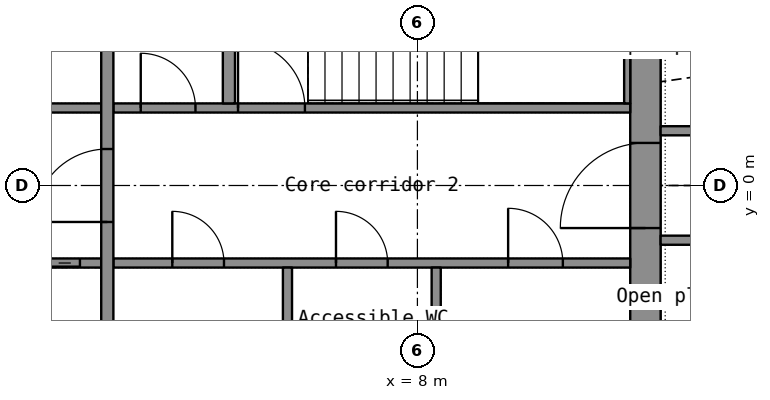
"""IFC4 building model, lengths in metres.
Left out: names, types, materials, properties, quantities, classifications, styles, units other than length and angle.
Written with IfcOpenShell. Run it as: python <this file> out.ifc"""

import sys

from ifc_helpers import new_model, si_unit, direction, frame, frame_2d, origin, place, context, subcontext, project, spatial, rectangle, extrude, element, fill, save


model = new_model("IFC4")
c1 = context("Model", 3, precision=1e-05, world=origin(), true_north=direction((0.0, 1.0)))
c2 = subcontext(c1, "Body", "Model", "MODEL_VIEW")
j1 = project(units=[si_unit("LENGTHUNIT", "METRE"), si_unit("PLANEANGLEUNIT", "RADIAN")], contexts=[c1])
p1 = place(None, origin())
s1 = spatial("IfcSite", under=j1, at=p1, CompositionType="ELEMENT")
p2 = place(p1, origin())
s2 = spatial("IfcBuilding", under=s1, at=p2, CompositionType="ELEMENT")
p3 = place(p2, frame((0.0, 0.0, 108.2)))
s3 = spatial("IfcBuildingStorey", under=s2, at=p3, CompositionType="ELEMENT", Elevation=108.2)
p4 = place(p3, frame((11.75, -7.2, 0.0), z_axis=(0.0, 0.0, 1.0), x_axis=(0.0, 1.0, 0.0)))
e1 = element("IfcWall", 1, at=p4, inside=s3, PredefinedType="SHEAR", context=c2, shape_type="SweptSolid", body=[
    extrude(rectangle(XDim=14.4, YDim=0.5, at=frame_2d((7.2, 0.0))), origin(), (0.0, 0.0, 1.0), 3.3),
])
p5 = place(p4, frame((6.5, 0.0, 0.0)))
e2 = element("IfcOpeningElement", 2, at=p5, cuts=e1, PredefinedType="OPENING", context=c2, shape_type="SweptSolid", body=[
    extrude(rectangle(XDim=1.4, YDim=2.2, at=frame_2d((0.7, 1.1))), frame((0.0, 0.26, 0.0), z_axis=(0.0, -1.0, 0.0), x_axis=(1.0, 0.0, 0.0)), (0.0, 0.0, 1.0), 0.52),
])
p6 = place(p3, frame((-2.8, -1.275, 0.0), z_axis=(0.0, 0.0, 1.0), x_axis=(1.0, 0.0, 0.0)))
e3 = element("IfcWall", 3, at=p6, inside=s3, PredefinedType="SHEAR", context=c2, shape_type="SweptSolid", body=[
    extrude(rectangle(XDim=5.6, YDim=0.15, at=frame_2d((2.8, 0.0))), origin(), (0.0, 0.0, 1.0), 3.3),
])
p7 = place(p6, frame((4.15, 0.0, 0.0)))
e4 = element("IfcOpeningElement", 4, at=p7, cuts=e3, PredefinedType="OPENING", context=c2, shape_type="SweptSolid", body=[
    extrude(rectangle(XDim=1.1, YDim=2.2, at=frame_2d((0.55, 1.1))), frame((0.0, 0.085, 0.0), z_axis=(0.0, -1.0, 0.0), x_axis=(1.0, 0.0, 0.0)), (0.0, 0.0, 1.0), 0.17),
])
p8 = place(p6, frame((0.413, 0.0, 0.0)))
e5 = element("IfcOpeningElement", 5, at=p8, cuts=e3, PredefinedType="OPENING", context=c2, shape_type="SweptSolid", body=[
    extrude(rectangle(XDim=0.9, YDim=2.1, at=frame_2d((0.45, 1.05))), frame((0.0, 0.085, 0.0), z_axis=(0.0, -1.0, 0.0), x_axis=(1.0, 0.0, 0.0)), (0.0, 0.0, 1.0), 0.17),
])
p9 = place(p6, frame((2.288, 0.0, 0.0)))
e6 = element("IfcOpeningElement", 6, at=p9, cuts=e3, PredefinedType="OPENING", context=c2, shape_type="SweptSolid", body=[
    extrude(rectangle(XDim=0.9, YDim=2.1, at=frame_2d((0.45, 1.05))), frame((0.0, 0.085, 0.0), z_axis=(0.0, -1.0, 0.0), x_axis=(1.0, 0.0, 0.0)), (0.0, 0.0, 1.0), 0.17),
])
p10 = place(p3, frame((3.0, -1.275, 0.0), z_axis=(0.0, 0.0, 1.0), x_axis=(1.0, 0.0, 0.0)))
e7 = element("IfcWall", 7, at=p10, inside=s3, PredefinedType="PARTITIONING", context=c2, shape_type="SweptSolid", body=[
    extrude(rectangle(XDim=8.5, YDim=0.15, at=frame_2d((4.25, 0.0))), origin(), (0.0, 0.0, 1.0), 3.3),
])
p11 = place(p10, frame((0.969, 0.0, 0.0)))
e8 = element("IfcOpeningElement", 8, at=p11, cuts=e7, PredefinedType="OPENING", context=c2, shape_type="SweptSolid", body=[
    extrude(rectangle(XDim=0.85, YDim=2.1, at=frame_2d((0.425, 1.05))), frame((0.0, 0.085, 0.0), z_axis=(0.0, -1.0, 0.0), x_axis=(1.0, 0.0, 0.0)), (0.0, 0.0, 1.0), 0.17),
])
p12 = place(p10, frame((3.661, 0.0, 0.0)))
e9 = element("IfcOpeningElement", 9, at=p12, cuts=e7, PredefinedType="OPENING", context=c2, shape_type="SweptSolid", body=[
    extrude(rectangle(XDim=0.85, YDim=2.1, at=frame_2d((0.425, 1.05))), frame((0.0, 0.085, 0.0), z_axis=(0.0, -1.0, 0.0), x_axis=(1.0, 0.0, 0.0)), (0.0, 0.0, 1.0), 0.17),
])
p13 = place(p10, frame((6.492, 0.0, 0.0)))
e10 = element("IfcOpeningElement", 10, at=p13, cuts=e7, PredefinedType="OPENING", context=c2, shape_type="SweptSolid", body=[
    extrude(rectangle(XDim=0.9, YDim=2.1, at=frame_2d((0.45, 1.05))), frame((0.0, 0.085, 0.0), z_axis=(0.0, -1.0, 0.0), x_axis=(1.0, 0.0, 0.0)), (0.0, 0.0, 1.0), 0.17),
])
p14 = place(p3, frame((-2.8, 1.275, 0.0), z_axis=(0.0, 0.0, 1.0), x_axis=(1.0, 0.0, 0.0)))
e11 = element("IfcWall", 11, at=p14, inside=s3, PredefinedType="SHEAR", context=c2, shape_type="SweptSolid", body=[
    extrude(rectangle(XDim=5.6, YDim=0.15, at=frame_2d((2.8, 0.0))), origin(), (0.0, 0.0, 1.0), 3.3),
])
p15 = place(p14, frame((0.35, 0.0, 0.0)))
e12 = element("IfcOpeningElement", 12, at=p15, cuts=e11, PredefinedType="OPENING", context=c2, shape_type="SweptSolid", body=[
    extrude(rectangle(XDim=1.1, YDim=2.2, at=frame_2d((0.55, 1.1))), frame((0.0, 0.085, 0.0), z_axis=(0.0, -1.0, 0.0), x_axis=(1.0, 0.0, 0.0)), (0.0, 0.0, 1.0), 0.17),
])
p16 = place(p14, frame((3.35, 0.0, 0.0)))
e13 = element("IfcOpeningElement", 13, at=p16, cuts=e11, PredefinedType="OPENING", context=c2, shape_type="SweptSolid", body=[
    extrude(rectangle(XDim=0.9, YDim=2.1, at=frame_2d((0.45, 1.05))), frame((0.0, 0.085, 0.0), z_axis=(0.0, -1.0, 0.0), x_axis=(1.0, 0.0, 0.0)), (0.0, 0.0, 1.0), 0.17),
])
p17 = place(p3, frame((3.0, 1.275, 0.0), z_axis=(0.0, 0.0, 1.0), x_axis=(1.0, 0.0, 0.0)))
e14 = element("IfcWall", 14, at=p17, inside=s3, PredefinedType="SHEAR", context=c2, shape_type="SweptSolid", body=[
    extrude(rectangle(XDim=8.5, YDim=0.15, at=frame_2d((4.25, 0.0))), origin(), (0.0, 0.0, 1.0), 3.3),
])
p18 = place(p17, frame((2.05, 0.0, 0.0)))
e15 = element("IfcOpeningElement", 15, at=p18, cuts=e14, PredefinedType="OPENING", context=c2, shape_type="SweptSolid", body=[
    extrude(rectangle(XDim=1.1, YDim=2.15, at=frame_2d((0.55, 1.075))), frame((0.0, 0.085, 0.0), z_axis=(0.0, -1.0, 0.0), x_axis=(1.0, 0.0, 0.0)), (0.0, 0.0, 1.0), 0.17),
])
p19 = place(p17, frame((0.45, 0.0, 0.0)))
e16 = element("IfcOpeningElement", 16, at=p19, cuts=e14, PredefinedType="OPENING", context=c2, shape_type="SweptSolid", body=[
    extrude(rectangle(XDim=0.9, YDim=2.1, at=frame_2d((0.45, 1.05))), frame((0.0, 0.085, 0.0), z_axis=(0.0, -1.0, 0.0), x_axis=(1.0, 0.0, 0.0)), (0.0, 0.0, 1.0), 0.17),
])
p20 = place(p3, frame((2.9, -3.7, 0.0), z_axis=(0.0, 0.0, 1.0), x_axis=(0.0, 1.0, 0.0)))
e17 = element("IfcWall", 17, at=p20, inside=s3, PredefinedType="SHEAR", context=c2, shape_type="SweptSolid", body=[
    extrude(rectangle(XDim=7.4, YDim=0.2, at=frame_2d((3.7, 0.0))), origin(), (0.0, 0.0, 1.0), 3.3),
])
p21 = place(p20, frame((3.1, 0.0, 0.0)))
e18 = element("IfcOpeningElement", 18, at=p21, cuts=e17, PredefinedType="OPENING", context=c2, shape_type="SweptSolid", body=[
    extrude(rectangle(XDim=1.2, YDim=2.2, at=frame_2d((0.6, 1.1))), frame((0.0, 0.11, 0.0), z_axis=(0.0, -1.0, 0.0), x_axis=(1.0, 0.0, 0.0)), (0.0, 0.0, 1.0), 0.22),
])
p22 = place(p3, frame((11.45, 1.35, 0.0), z_axis=(0.0, 0.0, 1.0), x_axis=(0.0, 1.0, 0.0)))
e19 = element("IfcWall", 19, at=p22, inside=s3, PredefinedType="SHEAR", context=c2, shape_type="SweptSolid", body=[
    extrude(rectangle(XDim=2.35, YDim=0.1, at=frame_2d((1.175, 0.0))), origin(), (0.0, 0.0, 1.0), 3.3),
])
p23 = place(p3, frame((4.9, 1.35, 0.0), z_axis=(0.0, 0.0, 1.0), x_axis=(0.0, 1.0, 0.0)))
e20 = element("IfcWall", 20, at=p23, inside=s3, PredefinedType="SHEAR", context=c2, shape_type="SweptSolid", body=[
    extrude(rectangle(XDim=2.35, YDim=0.2, at=frame_2d((1.175, 0.0))), origin(), (0.0, 0.0, 1.0), 3.3),
])
for number, where, z_axis, x_axis in (
    (21, (5.863, -3.7, 0.0), (0.0, 0.0, 1.0), (0.0, 1.0, 0.0)),
    (22, (8.309, -3.7, 0.0), (0.0, 0.0, 1.0), (0.0, 1.0, 0.0)),
):
    element("IfcWall", number, at=place(p3, frame(where, z_axis=z_axis, x_axis=x_axis)), inside=s3, PredefinedType="PARTITIONING", context=c2, shape_type="SweptSolid", body=[
        extrude(rectangle(XDim=2.35, YDim=0.15, at=frame_2d((1.175, 0.0))), origin(), (0.0, 0.0, 1.0), 3.3),
    ])
for number, where, z_axis, x_axis in (
    (23, (12.0, -0.9, 0.0), (0.0, 0.0, 1.0), (1.0, 0.0, 0.0)),
    (24, (15.923, 0.9, 0.0), (0.0, 0.0, 1.0), (-1.0, 0.0, 0.0)),
):
    element("IfcWall", number, at=place(p3, frame(where, z_axis=z_axis, x_axis=x_axis)), inside=s3, PredefinedType="PARTITIONING", context=c2, shape_type="SweptSolid", body=[
        extrude(rectangle(XDim=3.923, YDim=0.15, at=frame_2d((1.961, 0.0))), origin(), (0.0, 0.0, 1.0), 2.4),
    ])
p24 = place(p5, origin())
e25 = element("IfcDoor", 25, at=p24, inside=s3, OperationType="DOUBLE_DOOR_SINGLE_SWING", PredefinedType="DOOR", context=c2, shape_type="SweptSolid", body=[
    extrude(rectangle(XDim=1.4, YDim=2.2, at=frame_2d((0.7, 1.1))), frame((0.0, 0.025, 0.0), z_axis=(0.0, -1.0, 0.0), x_axis=(1.0, 0.0, 0.0)), (0.0, 0.0, 1.0), 0.05),
])
fill(e2, e25)
p25 = place(p21, origin())
e26 = element("IfcDoor", 26, at=p25, inside=s3, OperationType="SINGLE_SWING_LEFT", PredefinedType="DOOR", context=c2, shape_type="SweptSolid", body=[
    extrude(rectangle(XDim=1.2, YDim=2.2, at=frame_2d((0.6, 1.1))), frame((0.0, 0.025, 0.0), z_axis=(0.0, -1.0, 0.0), x_axis=(1.0, 0.0, 0.0)), (0.0, 0.0, 1.0), 0.05),
])
fill(e18, e26)
p26 = place(p7, origin())
e27 = element("IfcDoor", 27, at=p26, inside=s3, OperationType="DOUBLE_DOOR_SLIDING", PredefinedType="DOOR", context=c2, shape_type="SweptSolid", body=[
    extrude(rectangle(XDim=1.1, YDim=2.2, at=frame_2d((0.55, 1.1))), frame((0.0, 0.025, 0.0), z_axis=(0.0, -1.0, 0.0), x_axis=(1.0, 0.0, 0.0)), (0.0, 0.0, 1.0), 0.05),
])
fill(e4, e27)
p27 = place(p18, origin())
e28 = element("IfcDoor", 28, at=p27, inside=s3, OperationType="SINGLE_SWING_LEFT", PredefinedType="DOOR", context=c2, shape_type="SweptSolid", body=[
    extrude(rectangle(XDim=1.1, YDim=2.15, at=frame_2d((0.55, 1.075))), frame((0.0, 0.025, 0.0), z_axis=(0.0, -1.0, 0.0), x_axis=(1.0, 0.0, 0.0)), (0.0, 0.0, 1.0), 0.05),
])
fill(e15, e28)
p28 = place(p11, origin())
e29 = element("IfcDoor", 29, at=p28, inside=s3, OperationType="SINGLE_SWING_LEFT", PredefinedType="DOOR", context=c2, shape_type="SweptSolid", body=[
    extrude(rectangle(XDim=0.85, YDim=2.1, at=frame_2d((0.425, 1.05))), frame((0.0, 0.025, 0.0), z_axis=(0.0, -1.0, 0.0), x_axis=(1.0, 0.0, 0.0)), (0.0, 0.0, 1.0), 0.05),
])
fill(e8, e29)
p29 = place(p12, origin())
e30 = element("IfcDoor", 30, at=p29, inside=s3, OperationType="SINGLE_SWING_LEFT", PredefinedType="DOOR", context=c2, shape_type="SweptSolid", body=[
    extrude(rectangle(XDim=0.85, YDim=2.1, at=frame_2d((0.425, 1.05))), frame((0.0, 0.025, 0.0), z_axis=(0.0, -1.0, 0.0), x_axis=(1.0, 0.0, 0.0)), (0.0, 0.0, 1.0), 0.05),
])
fill(e9, e30)
p30 = place(p13, origin())
e31 = element("IfcDoor", 31, at=p30, inside=s3, OperationType="SINGLE_SWING_LEFT", PredefinedType="DOOR", context=c2, shape_type="SweptSolid", body=[
    extrude(rectangle(XDim=0.9, YDim=2.1, at=frame_2d((0.45, 1.05))), frame((0.0, 0.025, 0.0), z_axis=(0.0, -1.0, 0.0), x_axis=(1.0, 0.0, 0.0)), (0.0, 0.0, 1.0), 0.05),
])
fill(e10, e31)
p31 = place(p19, origin())
e32 = element("IfcDoor", 32, at=p31, inside=s3, OperationType="SINGLE_SWING_LEFT", PredefinedType="DOOR", context=c2, shape_type="SweptSolid", body=[
    extrude(rectangle(XDim=0.9, YDim=2.1, at=frame_2d((0.45, 1.05))), frame((0.0, 0.025, 0.0), z_axis=(0.0, -1.0, 0.0), x_axis=(1.0, 0.0, 0.0)), (0.0, 0.0, 1.0), 0.05),
])
fill(e16, e32)
save(model, sys.argv[1])
